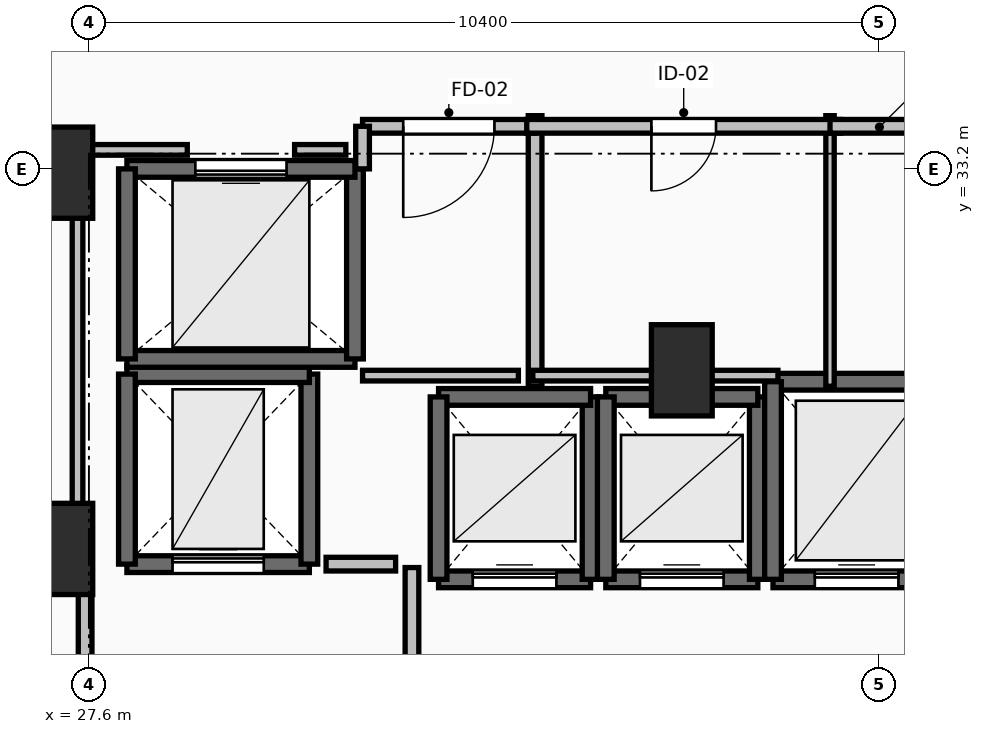
"""IFC4 building model, lengths in metres.
Left out: names, types, materials, properties, quantities, classifications, styles, units other than length and angle.
Written with IfcOpenShell. Run it as: python <this file> out.ifc"""

import sys

from ifc_helpers import new_model, si_unit, direction, frame, frame_2d, origin, origin_2d, place, context, subcontext, project, spatial, rectangle, extrude, element, fill, save


model = new_model("IFC4")
c1 = context("Model", 3, precision=1e-05, world=origin(), true_north=direction((0.0, 1.0)))
c2 = subcontext(c1, "Body", "Model", "MODEL_VIEW")
j1 = project(units=[si_unit("LENGTHUNIT", "METRE"), si_unit("PLANEANGLEUNIT", "RADIAN")], contexts=[c1])
p1 = place(None, origin())
s1 = spatial("IfcSite", under=j1, at=p1, CompositionType="ELEMENT")
p2 = place(p1, origin())
s2 = spatial("IfcBuilding", under=s1, at=p2, CompositionType="ELEMENT")
p3 = place(p2, frame((0.0, 0.0, 4.8)))
s3 = spatial("IfcBuildingStorey", under=s2, at=p3, CompositionType="ELEMENT", Elevation=4.8)
for number, where, z_axis, x_axis in (
    (1, (27.25, 28.2, 0.0), (0.0, 0.0, 1.0), (1.0, 0.0, 0.0)),
    (2, (27.25, 33.15, 0.0), (0.0, 0.0, 1.0), (1.0, 0.0, 0.0)),
    (3, (35.4, 30.55, 0.0), (0.0, 0.0, 1.0), (1.0, 0.0, 0.0)),
):
    element("IfcColumn", number, at=place(p3, frame(where, z_axis=z_axis, x_axis=x_axis)), inside=s3, PredefinedType="PILASTER", context=c2, shape_type="SweptSolid", body=[
        extrude(rectangle(XDim=0.8, YDim=1.2, at=origin_2d()), origin(), (0.0, 0.0, 1.0), 4.8),
    ])
p4 = place(p3, frame((32.2, 27.8, 0.0), z_axis=(0.0, 0.0, 1.0), x_axis=(1.0, 0.0, 0.0)))
e4 = element("IfcWall", 4, at=p4, inside=s3, PredefinedType="SOLIDWALL", context=c2, shape_type="SweptSolid", body=[
    extrude(rectangle(XDim=2.0, YDim=0.22, at=frame_2d((1.0, 0.0))), origin(), (0.0, 0.0, 1.0), 4.48),
])
p5 = place(p4, frame((0.45, 0.0, 0.0)))
e5 = element("IfcOpeningElement", 5, at=p5, cuts=e4, PredefinedType="OPENING", context=c2, shape_type="SweptSolid", body=[
    extrude(rectangle(XDim=1.1, YDim=2.2, at=frame_2d((0.55, 1.1))), frame((0.0, 0.125, 0.0), z_axis=(0.0, -1.0, 0.0), x_axis=(1.0, 0.0, 0.0)), (0.0, 0.0, 1.0), 0.25),
])
p6 = place(p3, frame((34.2, 27.8, 0.0), z_axis=(0.0, 0.0, 1.0), x_axis=(0.0, 1.0, 0.0)))
e6 = element("IfcWall", 6, at=p6, inside=s3, PredefinedType="SOLIDWALL", context=c2, shape_type="SweptSolid", body=[
    extrude(rectangle(XDim=2.4, YDim=0.22, at=frame_2d((1.2, 0.0))), origin(), (0.0, 0.0, 1.0), 4.48),
])
p7 = place(p3, frame((34.2, 30.2, 0.0), z_axis=(0.0, 0.0, 1.0), x_axis=(-1.0, 0.0, 0.0)))
e7 = element("IfcWall", 7, at=p7, inside=s3, PredefinedType="SOLIDWALL", context=c2, shape_type="SweptSolid", body=[
    extrude(rectangle(XDim=2.0, YDim=0.22, at=frame_2d((1.0, 0.0))), origin(), (0.0, 0.0, 1.0), 4.48),
])
p8 = place(p3, frame((32.2, 30.2, 0.0), z_axis=(0.0, 0.0, 1.0), x_axis=(0.0, -1.0, 0.0)))
e8 = element("IfcWall", 8, at=p8, inside=s3, PredefinedType="SOLIDWALL", context=c2, shape_type="SweptSolid", body=[
    extrude(rectangle(XDim=2.4, YDim=0.22, at=frame_2d((1.2, 0.0))), origin(), (0.0, 0.0, 1.0), 4.48),
])
p9 = place(p3, frame((34.4, 27.8, 0.0), z_axis=(0.0, 0.0, 1.0), x_axis=(1.0, 0.0, 0.0)))
e9 = element("IfcWall", 9, at=p9, inside=s3, PredefinedType="SOLIDWALL", context=c2, shape_type="SweptSolid", body=[
    extrude(rectangle(XDim=2.0, YDim=0.22, at=frame_2d((1.0, 0.0))), origin(), (0.0, 0.0, 1.0), 4.48),
])
p10 = place(p9, frame((0.45, 0.0, 0.0)))
e10 = element("IfcOpeningElement", 10, at=p10, cuts=e9, PredefinedType="OPENING", context=c2, shape_type="SweptSolid", body=[
    extrude(rectangle(XDim=1.1, YDim=2.2, at=frame_2d((0.55, 1.1))), frame((0.0, 0.125, 0.0), z_axis=(0.0, -1.0, 0.0), x_axis=(1.0, 0.0, 0.0)), (0.0, 0.0, 1.0), 0.25),
])
p11 = place(p3, frame((36.4, 27.8, 0.0), z_axis=(0.0, 0.0, 1.0), x_axis=(0.0, 1.0, 0.0)))
e11 = element("IfcWall", 11, at=p11, inside=s3, PredefinedType="SOLIDWALL", context=c2, shape_type="SweptSolid", body=[
    extrude(rectangle(XDim=2.4, YDim=0.22, at=frame_2d((1.2, 0.0))), origin(), (0.0, 0.0, 1.0), 4.48),
])
p12 = place(p3, frame((36.4, 30.2, 0.0), z_axis=(0.0, 0.0, 1.0), x_axis=(-1.0, 0.0, 0.0)))
e12 = element("IfcWall", 12, at=p12, inside=s3, PredefinedType="SOLIDWALL", context=c2, shape_type="SweptSolid", body=[
    extrude(rectangle(XDim=2.0, YDim=0.22, at=frame_2d((1.0, 0.0))), origin(), (0.0, 0.0, 1.0), 4.48),
])
p13 = place(p3, frame((34.4, 30.2, 0.0), z_axis=(0.0, 0.0, 1.0), x_axis=(0.0, -1.0, 0.0)))
e13 = element("IfcWall", 13, at=p13, inside=s3, PredefinedType="SOLIDWALL", context=c2, shape_type="SweptSolid", body=[
    extrude(rectangle(XDim=2.4, YDim=0.22, at=frame_2d((1.2, 0.0))), origin(), (0.0, 0.0, 1.0), 4.48),
])
p14 = place(p3, frame((36.6, 27.8, 0.0), z_axis=(0.0, 0.0, 1.0), x_axis=(1.0, 0.0, 0.0)))
e14 = element("IfcWall", 14, at=p14, inside=s3, PredefinedType="SOLIDWALL", context=c2, shape_type="SweptSolid", body=[
    extrude(rectangle(XDim=2.2, YDim=0.22, at=frame_2d((1.1, 0.0))), origin(), (0.0, 0.0, 1.0), 4.48),
])
p15 = place(p14, frame((0.55, 0.0, 0.0)))
e15 = element("IfcOpeningElement", 15, at=p15, cuts=e14, PredefinedType="OPENING", context=c2, shape_type="SweptSolid", body=[
    extrude(rectangle(XDim=1.1, YDim=2.2, at=frame_2d((0.55, 1.1))), frame((0.0, 0.125, 0.0), z_axis=(0.0, -1.0, 0.0), x_axis=(1.0, 0.0, 0.0)), (0.0, 0.0, 1.0), 0.25),
])
p16 = place(p3, frame((38.8, 30.4, 0.0), z_axis=(0.0, 0.0, 1.0), x_axis=(-1.0, 0.0, 0.0)))
e16 = element("IfcWall", 16, at=p16, inside=s3, PredefinedType="SOLIDWALL", context=c2, shape_type="SweptSolid", body=[
    extrude(rectangle(XDim=2.2, YDim=0.22, at=frame_2d((1.1, 0.0))), origin(), (0.0, 0.0, 1.0), 4.48),
])
p17 = place(p3, frame((36.6, 30.4, 0.0), z_axis=(0.0, 0.0, 1.0), x_axis=(0.0, -1.0, 0.0)))
e17 = element("IfcWall", 17, at=p17, inside=s3, PredefinedType="SOLIDWALL", context=c2, shape_type="SweptSolid", body=[
    extrude(rectangle(XDim=2.6, YDim=0.22, at=frame_2d((1.3, 0.0))), origin(), (0.0, 0.0, 1.0), 4.48),
])
p18 = place(p3, frame((28.1, 28.0, 0.0), z_axis=(0.0, 0.0, 1.0), x_axis=(1.0, 0.0, 0.0)))
e18 = element("IfcWall", 18, at=p18, inside=s3, PredefinedType="SHEAR", context=c2, shape_type="SweptSolid", body=[
    extrude(rectangle(XDim=2.4, YDim=0.22, at=frame_2d((1.2, 0.0))), origin(), (0.0, 0.0, 1.0), 4.48),
])
p19 = place(p18, frame((0.6, 0.0, 0.0)))
e19 = element("IfcOpeningElement", 19, at=p19, cuts=e18, PredefinedType="OPENING", context=c2, shape_type="SweptSolid", body=[
    extrude(rectangle(XDim=1.2, YDim=2.2, at=frame_2d((0.6, 1.1))), frame((0.0, 0.125, 0.0), z_axis=(0.0, -1.0, 0.0), x_axis=(1.0, 0.0, 0.0)), (0.0, 0.0, 1.0), 0.25),
])
p20 = place(p3, frame((30.5, 28.0, 0.0), z_axis=(0.0, 0.0, 1.0), x_axis=(0.0, 1.0, 0.0)))
e20 = element("IfcWall", 20, at=p20, inside=s3, PredefinedType="SHEAR", context=c2, shape_type="SweptSolid", body=[
    extrude(rectangle(XDim=2.5, YDim=0.22, at=frame_2d((1.25, 0.0))), origin(), (0.0, 0.0, 1.0), 4.48),
])
p21 = place(p3, frame((30.5, 30.5, 0.0), z_axis=(0.0, 0.0, 1.0), x_axis=(-1.0, 0.0, 0.0)))
e21 = element("IfcWall", 21, at=p21, inside=s3, PredefinedType="SHEAR", context=c2, shape_type="SweptSolid", body=[
    extrude(rectangle(XDim=2.4, YDim=0.22, at=frame_2d((1.2, 0.0))), origin(), (0.0, 0.0, 1.0), 4.48),
])
p22 = place(p3, frame((28.1, 30.5, 0.0), z_axis=(0.0, 0.0, 1.0), x_axis=(0.0, -1.0, 0.0)))
e22 = element("IfcWall", 22, at=p22, inside=s3, PredefinedType="SHEAR", context=c2, shape_type="SweptSolid", body=[
    extrude(rectangle(XDim=2.5, YDim=0.22, at=frame_2d((1.25, 0.0))), origin(), (0.0, 0.0, 1.0), 4.48),
])
p23 = place(p3, frame((28.1, 30.7, 0.0), z_axis=(0.0, 0.0, 1.0), x_axis=(1.0, 0.0, 0.0)))
e23 = element("IfcWall", 23, at=p23, inside=s3, PredefinedType="SOLIDWALL", context=c2, shape_type="SweptSolid", body=[
    extrude(rectangle(XDim=3.0, YDim=0.22, at=frame_2d((1.5, 0.0))), origin(), (0.0, 0.0, 1.0), 4.48),
])
p24 = place(p3, frame((31.1, 30.7, 0.0), z_axis=(0.0, 0.0, 1.0), x_axis=(0.0, 1.0, 0.0)))
e24 = element("IfcWall", 24, at=p24, inside=s3, PredefinedType="SOLIDWALL", context=c2, shape_type="SweptSolid", body=[
    extrude(rectangle(XDim=2.5, YDim=0.22, at=frame_2d((1.25, 0.0))), origin(), (0.0, 0.0, 1.0), 4.48),
])
p25 = place(p3, frame((31.1, 33.2, 0.0), z_axis=(0.0, 0.0, 1.0), x_axis=(-1.0, 0.0, 0.0)))
e25 = element("IfcWall", 25, at=p25, inside=s3, PredefinedType="SOLIDWALL", context=c2, shape_type="SweptSolid", body=[
    extrude(rectangle(XDim=3.0, YDim=0.22, at=frame_2d((1.5, 0.0))), origin(), (0.0, 0.0, 1.0), 4.48),
])
p26 = place(p25, frame((0.9, 0.0, 0.0)))
e26 = element("IfcOpeningElement", 26, at=p26, cuts=e25, PredefinedType="OPENING", context=c2, shape_type="SweptSolid", body=[
    extrude(rectangle(XDim=1.2, YDim=2.2, at=frame_2d((0.6, 1.1))), frame((0.0, 0.125, 0.0), z_axis=(0.0, -1.0, 0.0), x_axis=(1.0, 0.0, 0.0)), (0.0, 0.0, 1.0), 0.25),
])
p27 = place(p3, frame((28.1, 33.2, 0.0), z_axis=(0.0, 0.0, 1.0), x_axis=(0.0, -1.0, 0.0)))
e27 = element("IfcWall", 27, at=p27, inside=s3, PredefinedType="SOLIDWALL", context=c2, shape_type="SweptSolid", body=[
    extrude(rectangle(XDim=2.5, YDim=0.22, at=frame_2d((1.25, 0.0))), origin(), (0.0, 0.0, 1.0), 4.48),
])
p28 = place(p3, frame((31.85, 24.045, 0.0), z_axis=(0.0, 0.0, 1.0), x_axis=(0.0, 1.0, 0.0)))
e28 = element("IfcWall", 28, at=p28, inside=s3, PredefinedType="PARTITIONING", context=c2, shape_type="SweptSolid", body=[
    extrude(rectangle(XDim=3.91, YDim=0.18, at=frame_2d((1.955, 0.0))), origin(), (0.0, 0.0, 1.0), 4.48),
])
p29 = place(p28, frame((1.355, 0.0, 0.0)))
e29 = element("IfcOpeningElement", 29, at=p29, cuts=e28, PredefinedType="OPENING", context=c2, shape_type="SweptSolid", body=[
    extrude(rectangle(XDim=1.2, YDim=2.15, at=frame_2d((0.6, 1.075))), frame((0.0, 0.105, 0.0), z_axis=(0.0, -1.0, 0.0), x_axis=(1.0, 0.0, 0.0)), (0.0, 0.0, 1.0), 0.21),
])
p30 = place(p3, frame((27.55, 28.0, 0.0), z_axis=(0.0, 0.0, 1.0), x_axis=(0.0, -1.0, 0.0)))
e30 = element("IfcWall", 30, at=p30, inside=s3, PredefinedType="PARTITIONING", context=c2, shape_type="SweptSolid", body=[
    extrude(rectangle(XDim=4.05, YDim=0.18, at=frame_2d((2.025, 0.0))), origin(), (0.0, 0.0, 1.0), 4.48),
])
p31 = place(p30, frame((1.425, 0.0, 0.0)))
e31 = element("IfcOpeningElement", 31, at=p31, cuts=e30, PredefinedType="OPENING", context=c2, shape_type="SweptSolid", body=[
    extrude(rectangle(XDim=1.2, YDim=2.15, at=frame_2d((0.6, 1.075))), frame((0.0, 0.105, 0.0), z_axis=(0.0, -1.0, 0.0), x_axis=(1.0, 0.0, 0.0)), (0.0, 0.0, 1.0), 0.21),
])
p32 = place(p3, frame((33.47, 30.34, 0.0), z_axis=(0.0, 0.0, 1.0), x_axis=(0.0, 1.0, 0.0)))
e32 = element("IfcWall", 32, at=p32, inside=s3, PredefinedType="PARTITIONING", context=c2, shape_type="SweptSolid", body=[
    extrude(rectangle(XDim=3.56, YDim=0.18, at=frame_2d((1.78, 0.0))), origin(), (0.0, 0.0, 1.0), 4.48),
])
p33 = place(p3, frame((33.47, 33.76, 0.0), z_axis=(0.0, 0.0, 1.0), x_axis=(-1.0, 0.0, 0.0)))
e33 = element("IfcWall", 33, at=p33, inside=s3, PredefinedType="PARTITIONING", context=c2, shape_type="SweptSolid", body=[
    extrude(rectangle(XDim=2.27, YDim=0.18, at=frame_2d((1.135, 0.0))), origin(), (0.0, 0.0, 1.0), 4.48),
])
p34 = place(p33, frame((0.535, 0.0, 0.0)))
e34 = element("IfcOpeningElement", 34, at=p34, cuts=e33, PredefinedType="OPENING", context=c2, shape_type="SweptSolid", body=[
    extrude(rectangle(XDim=1.2, YDim=2.15, at=frame_2d((0.6, 1.075))), frame((0.0, 0.105, 0.0), z_axis=(0.0, -1.0, 0.0), x_axis=(1.0, 0.0, 0.0)), (0.0, 0.0, 1.0), 0.21),
])
p35 = place(p3, frame((31.2, 33.76, 0.0), z_axis=(0.0, 0.0, 1.0), x_axis=(0.0, -1.0, 0.0)))
e35 = element("IfcWall", 35, at=p35, inside=s3, PredefinedType="PARTITIONING", context=c2, shape_type="SweptSolid", body=[
    extrude(rectangle(XDim=0.56, YDim=0.18, at=frame_2d((0.28, 0.0))), origin(), (0.0, 0.0, 1.0), 4.48),
])
p36 = place(p3, frame((37.35, 30.34, 0.0), z_axis=(0.0, 0.0, 1.0), x_axis=(0.0, 1.0, 0.0)))
e36 = element("IfcWall", 36, at=p36, inside=s3, PredefinedType="PARTITIONING", context=c2, shape_type="SweptSolid", body=[
    extrude(rectangle(XDim=3.56, YDim=0.11, at=frame_2d((1.78, 0.0))), origin(), (0.0, 0.0, 1.0), 3.672),
])
p37 = place(p3, frame((37.49, 33.76, 0.0), z_axis=(0.0, 0.0, 1.0), x_axis=(-1.0, 0.0, 0.0)))
e37 = element("IfcWall", 37, at=p37, inside=s3, PredefinedType="PARTITIONING", context=c2, shape_type="SweptSolid", body=[
    extrude(rectangle(XDim=4.13, YDim=0.18, at=frame_2d((2.065, 0.0))), origin(), (0.0, 0.0, 1.0), 4.48),
])
p38 = place(p37, frame((1.64, 0.0, 0.0)))
e38 = element("IfcOpeningElement", 38, at=p38, cuts=e37, PredefinedType="OPENING", context=c2, shape_type="SweptSolid", body=[
    extrude(rectangle(XDim=0.85, YDim=2.1, at=frame_2d((0.425, 1.05))), frame((0.0, 0.105, 0.0), z_axis=(0.0, -1.0, 0.0), x_axis=(1.0, 0.0, 0.0)), (0.0, 0.0, 1.0), 0.21),
])
p39 = place(p3, frame((44.26, 33.76, 0.0), z_axis=(0.0, 0.0, 1.0), x_axis=(-1.0, 0.0, 0.0)))
e39 = element("IfcWall", 39, at=p39, inside=s3, PredefinedType="PARTITIONING", context=c2, shape_type="SweptSolid", body=[
    extrude(rectangle(XDim=6.91, YDim=0.18, at=frame_2d((3.455, 0.0))), origin(), (0.0, 0.0, 1.0), 4.48),
])
p40 = place(p39, frame((3.03, 0.0, 0.0)))
e40 = element("IfcOpeningElement", 40, at=p40, cuts=e39, PredefinedType="OPENING", context=c2, shape_type="SweptSolid", body=[
    extrude(rectangle(XDim=0.85, YDim=2.1, at=frame_2d((0.425, 1.05))), frame((0.0, 0.105, 0.0), z_axis=(0.0, -1.0, 0.0), x_axis=(1.0, 0.0, 0.0)), (0.0, 0.0, 1.0), 0.21),
])
p41 = place(p3, frame((31.635, 28.0, 0.0), z_axis=(0.0, 0.0, 1.0), x_axis=(-1.0, 0.0, 0.0)))
e41 = element("IfcWall", 41, at=p41, inside=s3, PredefinedType="PARTITIONING", context=c2, shape_type="SweptSolid", body=[
    extrude(rectangle(XDim=0.915, YDim=0.18, at=frame_2d((0.458, 0.0))), origin(), (0.0, 0.0, 1.0), 4.48),
])
p42 = place(p3, frame((31.2, 30.48, 0.0), z_axis=(0.0, 0.0, 1.0), x_axis=(1.0, 0.0, 0.0)))
e42 = element("IfcWall", 42, at=p42, inside=s3, PredefinedType="PARTITIONING", context=c2, shape_type="SweptSolid", body=[
    extrude(rectangle(XDim=2.05, YDim=0.14, at=frame_2d((1.025, 0.0))), origin(), (0.0, 0.0, 1.0), 4.48),
])
p43 = place(p3, frame((33.44, 30.48, 0.0), z_axis=(0.0, 0.0, 1.0), x_axis=(1.0, 0.0, 0.0)))
e43 = element("IfcWall", 43, at=p43, inside=s3, PredefinedType="PARTITIONING", context=c2, shape_type="SweptSolid", body=[
    extrude(rectangle(XDim=3.225, YDim=0.14, at=frame_2d((1.613, 0.0))), origin(), (0.0, 0.0, 1.0), 3.672),
])
p44 = place(p3, frame((27.45, 28.196, 0.0), z_axis=(0.0, 0.0, 1.0), x_axis=(0.0, 1.0, 0.0)))
e44 = element("IfcWall", 44, at=p44, inside=s3, PredefinedType="PARTITIONING", context=c2, shape_type="SweptSolid", body=[
    extrude(rectangle(XDim=5.254, YDim=0.14, at=frame_2d((2.627, 0.0))), origin(), (0.0, 0.0, 1.0), 3.672),
])
p45 = place(p3, frame((27.45, 33.45, 0.0), z_axis=(0.0, 0.0, 1.0), x_axis=(1.0, 0.0, 0.0)))
e45 = element("IfcWall", 45, at=p45, inside=s3, PredefinedType="PARTITIONING", context=c2, shape_type="SweptSolid", body=[
    extrude(rectangle(XDim=1.444, YDim=0.14, at=frame_2d((0.722, 0.0))), origin(), (0.0, 0.0, 1.0), 3.672),
])
p46 = place(p3, frame((30.306, 33.45, 0.0), z_axis=(0.0, 0.0, 1.0), x_axis=(1.0, 0.0, 0.0)))
e46 = element("IfcWall", 46, at=p46, inside=s3, PredefinedType="PARTITIONING", context=c2, shape_type="SweptSolid", body=[
    extrude(rectangle(XDim=0.674, YDim=0.14, at=frame_2d((0.337, 0.0))), origin(), (0.0, 0.0, 1.0), 4.48),
])
p47 = place(p5, origin())
e47 = element("IfcDoor", 47, at=p47, inside=s3, OperationType="SLIDING_TO_LEFT", PredefinedType="DOOR", context=c2, shape_type="SweptSolid", body=[
    extrude(rectangle(XDim=1.1, YDim=2.2, at=frame_2d((0.55, 1.1))), frame((0.0, 0.025, 0.0), z_axis=(0.0, -1.0, 0.0), x_axis=(1.0, 0.0, 0.0)), (0.0, 0.0, 1.0), 0.05),
])
fill(e5, e47)
p48 = place(p10, origin())
e48 = element("IfcDoor", 48, at=p48, inside=s3, OperationType="SLIDING_TO_LEFT", PredefinedType="DOOR", context=c2, shape_type="SweptSolid", body=[
    extrude(rectangle(XDim=1.1, YDim=2.2, at=frame_2d((0.55, 1.1))), frame((0.0, 0.025, 0.0), z_axis=(0.0, -1.0, 0.0), x_axis=(1.0, 0.0, 0.0)), (0.0, 0.0, 1.0), 0.05),
])
fill(e10, e48)
p49 = place(p15, origin())
e49 = element("IfcDoor", 49, at=p49, inside=s3, OperationType="SLIDING_TO_LEFT", PredefinedType="DOOR", context=c2, shape_type="SweptSolid", body=[
    extrude(rectangle(XDim=1.1, YDim=2.2, at=frame_2d((0.55, 1.1))), frame((0.0, 0.025, 0.0), z_axis=(0.0, -1.0, 0.0), x_axis=(1.0, 0.0, 0.0)), (0.0, 0.0, 1.0), 0.05),
])
fill(e15, e49)
p50 = place(p19, origin())
e50 = element("IfcDoor", 50, at=p50, inside=s3, OperationType="SLIDING_TO_LEFT", PredefinedType="DOOR", context=c2, shape_type="SweptSolid", body=[
    extrude(rectangle(XDim=1.2, YDim=2.2, at=frame_2d((0.6, 1.1))), frame((0.0, 0.025, 0.0), z_axis=(0.0, -1.0, 0.0), x_axis=(1.0, 0.0, 0.0)), (0.0, 0.0, 1.0), 0.05),
])
fill(e19, e50)
p51 = place(p26, origin())
e51 = element("IfcDoor", 51, at=p51, inside=s3, OperationType="SLIDING_TO_LEFT", PredefinedType="DOOR", context=c2, shape_type="SweptSolid", body=[
    extrude(rectangle(XDim=1.2, YDim=2.2, at=frame_2d((0.6, 1.1))), frame((0.0, 0.025, 0.0), z_axis=(0.0, -1.0, 0.0), x_axis=(1.0, 0.0, 0.0)), (0.0, 0.0, 1.0), 0.05),
])
fill(e26, e51)
p52 = place(p34, origin())
e52 = element("IfcDoor", 52, at=p52, inside=s3, OperationType="SINGLE_SWING_RIGHT", PredefinedType="DOOR", context=c2, shape_type="SweptSolid", body=[
    extrude(rectangle(XDim=1.2, YDim=2.15, at=frame_2d((0.6, 1.075))), frame((0.0, 0.025, 0.0), z_axis=(0.0, -1.0, 0.0), x_axis=(1.0, 0.0, 0.0)), (0.0, 0.0, 1.0), 0.05),
])
fill(e34, e52)
p53 = place(p38, origin())
e53 = element("IfcDoor", 53, at=p53, inside=s3, OperationType="SINGLE_SWING_RIGHT", PredefinedType="DOOR", context=c2, shape_type="SweptSolid", body=[
    extrude(rectangle(XDim=0.85, YDim=2.1, at=frame_2d((0.425, 1.05))), frame((0.0, 0.025, 0.0), z_axis=(0.0, -1.0, 0.0), x_axis=(1.0, 0.0, 0.0)), (0.0, 0.0, 1.0), 0.05),
])
fill(e38, e53)
save(model, sys.argv[1])
